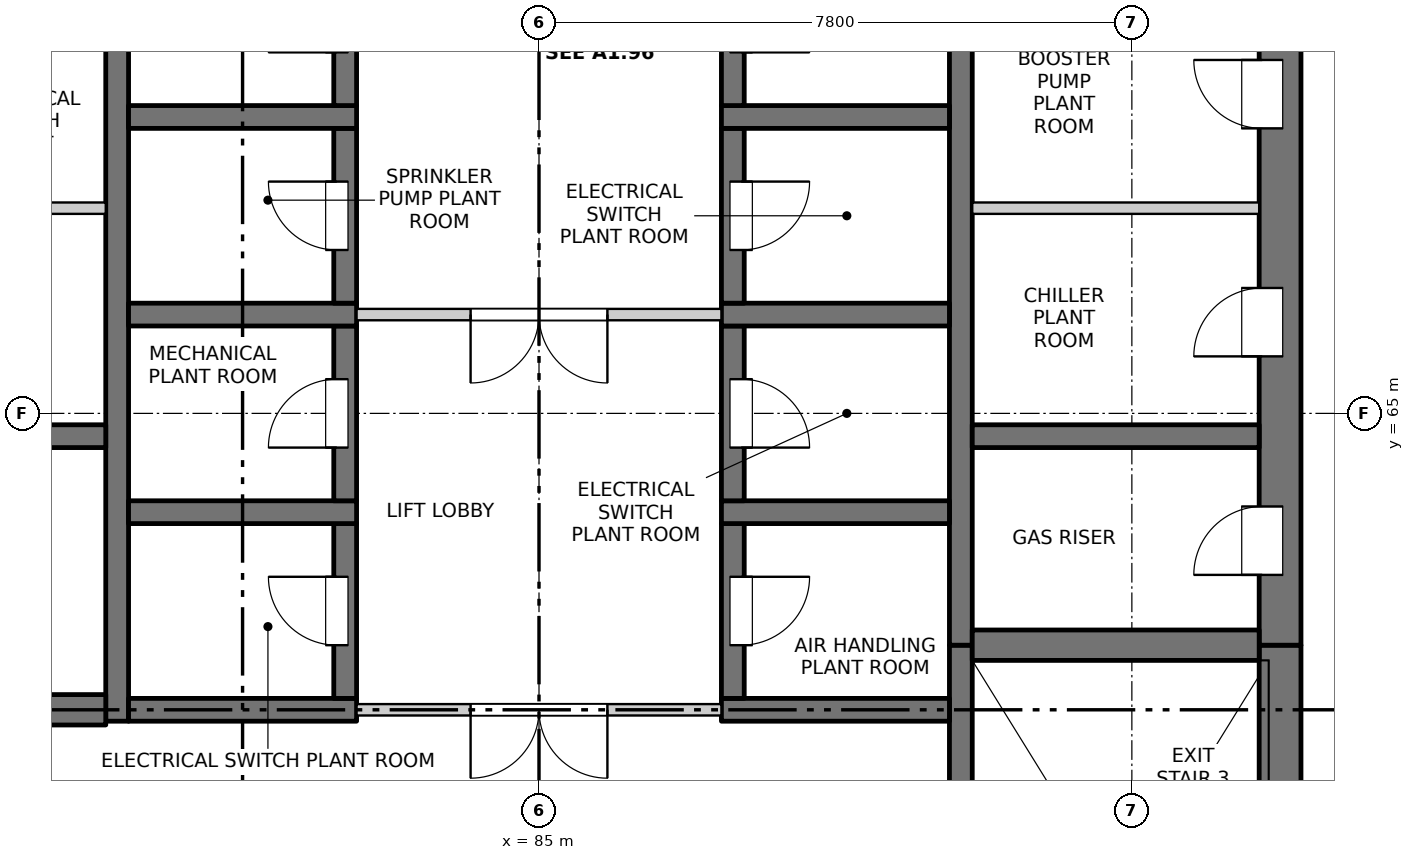
"""IFC4 building model, lengths in metres.
Left out: names, types, materials, properties, quantities, classifications, styles, units other than length and angle.
Written with IfcOpenShell. Run it as: python <this file> out.ifc"""

import sys

from ifc_helpers import new_model, si_unit, direction, frame, frame_2d, origin, place, context, subcontext, project, spatial, rectangle, extrude, element, fill, save


model = new_model("IFC4")
c1 = context("Model", 3, precision=1e-05, world=origin(), true_north=direction((0.0, 1.0)))
c2 = subcontext(c1, "Body", "Model", "MODEL_VIEW")
j1 = project(units=[si_unit("LENGTHUNIT", "METRE"), si_unit("PLANEANGLEUNIT", "RADIAN")], contexts=[c1])
p1 = place(None, origin())
s1 = spatial("IfcSite", under=j1, at=p1, CompositionType="ELEMENT")
p2 = place(p1, origin())
s2 = spatial("IfcBuilding", under=s1, at=p2, CompositionType="ELEMENT")
p3 = place(p2, frame((0.0, 0.0, 172.4)))
s3 = spatial("IfcBuildingStorey", under=s2, at=p3, CompositionType="ELEMENT", Elevation=172.4)
p4 = place(p3, frame((94.75, 54.975, -0.3), z_axis=(0.0, 0.0, 1.0), x_axis=(0.0, 1.0, 0.0)))
e1 = element("IfcWall", 1, at=p4, inside=s3, PredefinedType="SOLIDWALL", context=c2, shape_type="SweptSolid", body=[
    extrude(rectangle(XDim=6.975, YDim=0.55, at=frame_2d((3.487, 0.0))), origin(), (0.0, 0.0, 1.0), 6.8),
])
p5 = place(p4, frame((0.675, 0.0, 0.3)))
e2 = element("IfcOpeningElement", 2, at=p5, cuts=e1, PredefinedType="OPENING", context=c2, shape_type="SweptSolid", body=[
    extrude(rectangle(XDim=1.2, YDim=2.1, at=frame_2d((0.6, 1.05))), frame((0.0, 0.285, 0.0), z_axis=(0.0, -1.0, 0.0), x_axis=(1.0, 0.0, 0.0)), (0.0, 0.0, 1.0), 0.57),
])
p6 = place(p3, frame((94.75, 61.95, -0.3), z_axis=(0.0, 0.0, 1.0), x_axis=(0.0, 1.0, 0.0)))
e3 = element("IfcWall", 3, at=p6, inside=s3, PredefinedType="SOLIDWALL", context=c2, shape_type="SweptSolid", body=[
    extrude(rectangle(XDim=15.35, YDim=0.55, at=frame_2d((7.675, 0.0))), origin(), (0.0, 0.0, 1.0), 6.8),
])
p7 = place(p6, frame((0.925, 0.0, 0.3)))
e4 = element("IfcOpeningElement", 4, at=p7, cuts=e3, PredefinedType="OPENING", context=c2, shape_type="SweptSolid", body=[
    extrude(rectangle(XDim=0.9, YDim=2.1, at=frame_2d((0.45, 1.05))), frame((0.0, 0.285, 0.0), z_axis=(0.0, -1.0, 0.0), x_axis=(1.0, 0.0, 0.0)), (0.0, 0.0, 1.0), 0.57),
])
p8 = place(p6, frame((3.8, 0.0, 0.3)))
e5 = element("IfcOpeningElement", 5, at=p8, cuts=e3, PredefinedType="OPENING", context=c2, shape_type="SweptSolid", body=[
    extrude(rectangle(XDim=0.9, YDim=2.1, at=frame_2d((0.45, 1.05))), frame((0.0, 0.285, 0.0), z_axis=(0.0, -1.0, 0.0), x_axis=(1.0, 0.0, 0.0)), (0.0, 0.0, 1.0), 0.57),
])
p9 = place(p6, frame((6.8, 0.0, 0.3)))
e6 = element("IfcOpeningElement", 6, at=p9, cuts=e3, PredefinedType="OPENING", context=c2, shape_type="SweptSolid", body=[
    extrude(rectangle(XDim=0.9, YDim=2.1, at=frame_2d((0.45, 1.05))), frame((0.0, 0.285, 0.0), z_axis=(0.0, -1.0, 0.0), x_axis=(1.0, 0.0, 0.0)), (0.0, 0.0, 1.0), 0.57),
])
p10 = place(p6, frame((9.8, 0.0, 0.3)))
e7 = element("IfcOpeningElement", 7, at=p10, cuts=e3, PredefinedType="OPENING", context=c2, shape_type="SweptSolid", body=[
    extrude(rectangle(XDim=0.9, YDim=2.1, at=frame_2d((0.45, 1.05))), frame((0.0, 0.285, 0.0), z_axis=(0.0, -1.0, 0.0), x_axis=(1.0, 0.0, 0.0)), (0.0, 0.0, 1.0), 0.57),
])
p11 = place(p6, frame((13.1, 0.0, 0.3)))
e8 = element("IfcOpeningElement", 8, at=p11, cuts=e3, PredefinedType="OPENING", context=c2, shape_type="SweptSolid", body=[
    extrude(rectangle(XDim=0.9, YDim=2.1, at=frame_2d((0.45, 1.05))), frame((0.0, 0.285, 0.0), z_axis=(0.0, -1.0, 0.0), x_axis=(1.0, 0.0, 0.0)), (0.0, 0.0, 1.0), 0.57),
])
p12 = place(p3, frame((79.45, 60.95, -0.3), z_axis=(0.0, 0.0, 1.0), x_axis=(0.0, 1.0, 0.0)))
e9 = element("IfcWall", 9, at=p12, inside=s3, PredefinedType="SOLIDWALL", context=c2, shape_type="SweptSolid", body=[
    extrude(rectangle(XDim=16.35, YDim=0.3, at=frame_2d((8.175, 0.0))), origin(), (0.0, 0.0, 1.0), 6.8),
])
p13 = place(p3, frame((90.55, 55.525, -0.3), z_axis=(0.0, 0.0, 1.0), x_axis=(0.0, 1.0, 0.0)))
e10 = element("IfcWall", 10, at=p13, inside=s3, PredefinedType="SOLIDWALL", context=c2, shape_type="SweptSolid", body=[
    extrude(rectangle(XDim=6.425, YDim=0.3, at=frame_2d((3.212, 0.0))), origin(), (0.0, 0.0, 1.0), 6.8),
])
p14 = place(p13, frame((0.125, 0.0, 0.3)))
e11 = element("IfcOpeningElement", 11, at=p14, cuts=e10, PredefinedType="OPENING", context=c2, shape_type="SweptSolid", body=[
    extrude(rectangle(XDim=1.2, YDim=2.1, at=frame_2d((0.6, 1.05))), frame((0.0, 0.16, 0.0), z_axis=(0.0, -1.0, 0.0), x_axis=(1.0, 0.0, 0.0)), (0.0, 0.0, 1.0), 0.32),
])
p15 = place(p3, frame((90.55, 61.95, -0.3), z_axis=(0.0, 0.0, 1.0), x_axis=(0.0, 1.0, 0.0)))
e12 = element("IfcWall", 12, at=p15, inside=s3, PredefinedType="SOLIDWALL", context=c2, shape_type="SweptSolid", body=[
    extrude(rectangle(XDim=15.35, YDim=0.3, at=frame_2d((7.675, 0.0))), origin(), (0.0, 0.0, 1.0), 6.8),
])
p16 = place(p3, frame((79.6, 61.1, -0.3), z_axis=(0.0, 0.0, 1.0), x_axis=(1.0, 0.0, 0.0)))
e13 = element("IfcWall", 13, at=p16, inside=s3, PredefinedType="SOLIDWALL", context=c2, shape_type="SweptSolid", body=[
    extrude(rectangle(XDim=3.0, YDim=0.3, at=frame_2d((1.5, 0.0))), origin(), (0.0, 0.0, 1.0), 6.8),
])
p17 = place(p3, frame((82.45, 61.25, -0.3), z_axis=(0.0, 0.0, 1.0), x_axis=(0.0, 1.0, 0.0)))
e14 = element("IfcWall", 14, at=p17, inside=s3, PredefinedType="SOLIDWALL", context=c2, shape_type="SweptSolid", body=[
    extrude(rectangle(XDim=2.3, YDim=0.3, at=frame_2d((1.15, 0.0))), origin(), (0.0, 0.0, 1.0), 6.8),
])
p18 = place(p17, frame((0.7, 0.0, 0.3)))
e15 = element("IfcOpeningElement", 15, at=p18, cuts=e14, PredefinedType="OPENING", context=c2, shape_type="SweptSolid", body=[
    extrude(rectangle(XDim=0.9, YDim=2.1, at=frame_2d((0.45, 1.05))), frame((0.0, 0.16, 0.0), z_axis=(0.0, -1.0, 0.0), x_axis=(1.0, 0.0, 0.0)), (0.0, 0.0, 1.0), 0.32),
])
p19 = place(p3, frame((79.6, 63.7, -0.3), z_axis=(0.0, 0.0, 1.0), x_axis=(1.0, 0.0, 0.0)))
e16 = element("IfcWall", 16, at=p19, inside=s3, PredefinedType="SOLIDWALL", context=c2, shape_type="SweptSolid", body=[
    extrude(rectangle(XDim=3.0, YDim=0.3, at=frame_2d((1.5, 0.0))), origin(), (0.0, 0.0, 1.0), 6.8),
])
p20 = place(p3, frame((82.45, 63.85, -0.3), z_axis=(0.0, 0.0, 1.0), x_axis=(0.0, 1.0, 0.0)))
e17 = element("IfcWall", 17, at=p20, inside=s3, PredefinedType="SOLIDWALL", context=c2, shape_type="SweptSolid", body=[
    extrude(rectangle(XDim=2.3, YDim=0.3, at=frame_2d((1.15, 0.0))), origin(), (0.0, 0.0, 1.0), 6.8),
])
p21 = place(p20, frame((0.7, 0.0, 0.3)))
e18 = element("IfcOpeningElement", 18, at=p21, cuts=e17, PredefinedType="OPENING", context=c2, shape_type="SweptSolid", body=[
    extrude(rectangle(XDim=0.9, YDim=2.1, at=frame_2d((0.45, 1.05))), frame((0.0, 0.16, 0.0), z_axis=(0.0, -1.0, 0.0), x_axis=(1.0, 0.0, 0.0)), (0.0, 0.0, 1.0), 0.32),
])
p22 = place(p3, frame((79.6, 66.3, -0.3), z_axis=(0.0, 0.0, 1.0), x_axis=(1.0, 0.0, 0.0)))
e19 = element("IfcWall", 19, at=p22, inside=s3, PredefinedType="SOLIDWALL", context=c2, shape_type="SweptSolid", body=[
    extrude(rectangle(XDim=3.0, YDim=0.3, at=frame_2d((1.5, 0.0))), origin(), (0.0, 0.0, 1.0), 6.8),
])
p23 = place(p3, frame((82.45, 66.45, -0.3), z_axis=(0.0, 0.0, 1.0), x_axis=(0.0, 1.0, 0.0)))
e20 = element("IfcWall", 20, at=p23, inside=s3, PredefinedType="SOLIDWALL", context=c2, shape_type="SweptSolid", body=[
    extrude(rectangle(XDim=2.3, YDim=0.3, at=frame_2d((1.15, 0.0))), origin(), (0.0, 0.0, 1.0), 6.8),
])
p24 = place(p23, frame((0.7, 0.0, 0.3)))
e21 = element("IfcOpeningElement", 21, at=p24, cuts=e20, PredefinedType="OPENING", context=c2, shape_type="SweptSolid", body=[
    extrude(rectangle(XDim=0.9, YDim=2.1, at=frame_2d((0.45, 1.05))), frame((0.0, 0.16, 0.0), z_axis=(0.0, -1.0, 0.0), x_axis=(1.0, 0.0, 0.0)), (0.0, 0.0, 1.0), 0.32),
])
p25 = place(p3, frame((79.6, 68.9, -0.3), z_axis=(0.0, 0.0, 1.0), x_axis=(1.0, 0.0, 0.0)))
e22 = element("IfcWall", 22, at=p25, inside=s3, PredefinedType="SOLIDWALL", context=c2, shape_type="SweptSolid", body=[
    extrude(rectangle(XDim=3.0, YDim=0.3, at=frame_2d((1.5, 0.0))), origin(), (0.0, 0.0, 1.0), 6.8),
])
p26 = place(p3, frame((82.45, 69.05, -0.3), z_axis=(0.0, 0.0, 1.0), x_axis=(0.0, 1.0, 0.0)))
e23 = element("IfcWall", 23, at=p26, inside=s3, PredefinedType="SOLIDWALL", context=c2, shape_type="SweptSolid", body=[
    extrude(rectangle(XDim=2.3, YDim=0.3, at=frame_2d((1.15, 0.0))), origin(), (0.0, 0.0, 1.0), 6.8),
])
p27 = place(p26, frame((0.7, 0.0, 0.3)))
e24 = element("IfcOpeningElement", 24, at=p27, cuts=e23, PredefinedType="OPENING", context=c2, shape_type="SweptSolid", body=[
    extrude(rectangle(XDim=0.9, YDim=2.1, at=frame_2d((0.45, 1.05))), frame((0.0, 0.16, 0.0), z_axis=(0.0, -1.0, 0.0), x_axis=(1.0, 0.0, 0.0)), (0.0, 0.0, 1.0), 0.32),
])
p28 = place(p3, frame((87.4, 61.1, -0.3), z_axis=(0.0, 0.0, 1.0), x_axis=(1.0, 0.0, 0.0)))
e25 = element("IfcWall", 25, at=p28, inside=s3, PredefinedType="SOLIDWALL", context=c2, shape_type="SweptSolid", body=[
    extrude(rectangle(XDim=3.0, YDim=0.3, at=frame_2d((1.5, 0.0))), origin(), (0.0, 0.0, 1.0), 6.8),
])
p29 = place(p3, frame((87.55, 61.25, -0.3), z_axis=(0.0, 0.0, 1.0), x_axis=(0.0, 1.0, 0.0)))
e26 = element("IfcWall", 26, at=p29, inside=s3, PredefinedType="SOLIDWALL", context=c2, shape_type="SweptSolid", body=[
    extrude(rectangle(XDim=2.3, YDim=0.3, at=frame_2d((1.15, 0.0))), origin(), (0.0, 0.0, 1.0), 6.8),
])
p30 = place(p29, frame((0.7, 0.0, 0.3)))
e27 = element("IfcOpeningElement", 27, at=p30, cuts=e26, PredefinedType="OPENING", context=c2, shape_type="SweptSolid", body=[
    extrude(rectangle(XDim=0.9, YDim=2.1, at=frame_2d((0.45, 1.05))), frame((0.0, 0.16, 0.0), z_axis=(0.0, -1.0, 0.0), x_axis=(1.0, 0.0, 0.0)), (0.0, 0.0, 1.0), 0.32),
])
p31 = place(p3, frame((87.4, 63.7, -0.3), z_axis=(0.0, 0.0, 1.0), x_axis=(1.0, 0.0, 0.0)))
e28 = element("IfcWall", 28, at=p31, inside=s3, PredefinedType="SOLIDWALL", context=c2, shape_type="SweptSolid", body=[
    extrude(rectangle(XDim=3.0, YDim=0.3, at=frame_2d((1.5, 0.0))), origin(), (0.0, 0.0, 1.0), 6.8),
])
p32 = place(p3, frame((87.55, 63.85, -0.3), z_axis=(0.0, 0.0, 1.0), x_axis=(0.0, 1.0, 0.0)))
e29 = element("IfcWall", 29, at=p32, inside=s3, PredefinedType="SOLIDWALL", context=c2, shape_type="SweptSolid", body=[
    extrude(rectangle(XDim=2.3, YDim=0.3, at=frame_2d((1.15, 0.0))), origin(), (0.0, 0.0, 1.0), 6.8),
])
p33 = place(p32, frame((0.7, 0.0, 0.3)))
e30 = element("IfcOpeningElement", 30, at=p33, cuts=e29, PredefinedType="OPENING", context=c2, shape_type="SweptSolid", body=[
    extrude(rectangle(XDim=0.9, YDim=2.1, at=frame_2d((0.45, 1.05))), frame((0.0, 0.16, 0.0), z_axis=(0.0, -1.0, 0.0), x_axis=(1.0, 0.0, 0.0)), (0.0, 0.0, 1.0), 0.32),
])
p34 = place(p3, frame((87.4, 66.3, -0.3), z_axis=(0.0, 0.0, 1.0), x_axis=(1.0, 0.0, 0.0)))
e31 = element("IfcWall", 31, at=p34, inside=s3, PredefinedType="SOLIDWALL", context=c2, shape_type="SweptSolid", body=[
    extrude(rectangle(XDim=3.0, YDim=0.3, at=frame_2d((1.5, 0.0))), origin(), (0.0, 0.0, 1.0), 6.8),
])
p35 = place(p3, frame((87.55, 66.45, -0.3), z_axis=(0.0, 0.0, 1.0), x_axis=(0.0, 1.0, 0.0)))
e32 = element("IfcWall", 32, at=p35, inside=s3, PredefinedType="SOLIDWALL", context=c2, shape_type="SweptSolid", body=[
    extrude(rectangle(XDim=2.3, YDim=0.3, at=frame_2d((1.15, 0.0))), origin(), (0.0, 0.0, 1.0), 6.8),
])
p36 = place(p35, frame((0.7, 0.0, 0.3)))
e33 = element("IfcOpeningElement", 33, at=p36, cuts=e32, PredefinedType="OPENING", context=c2, shape_type="SweptSolid", body=[
    extrude(rectangle(XDim=0.9, YDim=2.1, at=frame_2d((0.45, 1.05))), frame((0.0, 0.16, 0.0), z_axis=(0.0, -1.0, 0.0), x_axis=(1.0, 0.0, 0.0)), (0.0, 0.0, 1.0), 0.32),
])
p37 = place(p3, frame((87.4, 68.9, -0.3), z_axis=(0.0, 0.0, 1.0), x_axis=(1.0, 0.0, 0.0)))
e34 = element("IfcWall", 34, at=p37, inside=s3, PredefinedType="SOLIDWALL", context=c2, shape_type="SweptSolid", body=[
    extrude(rectangle(XDim=3.0, YDim=0.3, at=frame_2d((1.5, 0.0))), origin(), (0.0, 0.0, 1.0), 6.8),
])
p38 = place(p3, frame((87.55, 69.05, -0.3), z_axis=(0.0, 0.0, 1.0), x_axis=(0.0, 1.0, 0.0)))
e35 = element("IfcWall", 35, at=p38, inside=s3, PredefinedType="SOLIDWALL", context=c2, shape_type="SweptSolid", body=[
    extrude(rectangle(XDim=2.3, YDim=0.3, at=frame_2d((1.15, 0.0))), origin(), (0.0, 0.0, 1.0), 6.8),
])
p39 = place(p38, frame((0.7, 0.0, 0.3)))
e36 = element("IfcOpeningElement", 36, at=p39, cuts=e35, PredefinedType="OPENING", context=c2, shape_type="SweptSolid", body=[
    extrude(rectangle(XDim=0.9, YDim=2.1, at=frame_2d((0.45, 1.05))), frame((0.0, 0.16, 0.0), z_axis=(0.0, -1.0, 0.0), x_axis=(1.0, 0.0, 0.0)), (0.0, 0.0, 1.0), 0.32),
])
p40 = place(p3, frame((75.525, 61.1, -0.3), z_axis=(0.0, 0.0, 1.0), x_axis=(1.0, 0.0, 0.0)))
e37 = element("IfcWall", 37, at=p40, inside=s3, PredefinedType="SOLIDWALL", context=c2, shape_type="SweptSolid", body=[
    extrude(rectangle(XDim=3.775, YDim=0.4, at=frame_2d((1.888, 0.0))), origin(), (0.0, 0.0, 1.0), 6.8),
])
p41 = place(p3, frame((75.525, 64.7, -0.3), z_axis=(0.0, 0.0, 1.0), x_axis=(1.0, 0.0, 0.0)))
e38 = element("IfcWall", 38, at=p41, inside=s3, PredefinedType="SOLIDWALL", context=c2, shape_type="SweptSolid", body=[
    extrude(rectangle(XDim=3.775, YDim=0.3, at=frame_2d((1.888, 0.0))), origin(), (0.0, 0.0, 1.0), 6.8),
])
p42 = place(p3, frame((90.7, 61.95, -0.3), z_axis=(0.0, 0.0, 1.0), x_axis=(1.0, 0.0, 0.0)))
e39 = element("IfcWall", 39, at=p42, inside=s3, PredefinedType="SOLIDWALL", context=c2, shape_type="SweptSolid", body=[
    extrude(rectangle(XDim=3.775, YDim=0.4, at=frame_2d((1.888, 0.0))), origin(), (0.0, 0.0, 1.0), 6.8),
])
p43 = place(p3, frame((90.7, 64.7, -0.3), z_axis=(0.0, 0.0, 1.0), x_axis=(1.0, 0.0, 0.0)))
e40 = element("IfcWall", 40, at=p43, inside=s3, PredefinedType="SOLIDWALL", context=c2, shape_type="SweptSolid", body=[
    extrude(rectangle(XDim=3.775, YDim=0.3, at=frame_2d((1.888, 0.0))), origin(), (0.0, 0.0, 1.0), 6.8),
])
p44 = place(p3, frame((82.6, 61.1, 0.0), z_axis=(0.0, 0.0, 1.0), x_axis=(1.0, 0.0, 0.0)))
e41 = element("IfcWall", 41, at=p44, inside=s3, PredefinedType="PARTITIONING", context=c2, shape_type="SweptSolid", body=[
    extrude(rectangle(XDim=4.8, YDim=0.15, at=frame_2d((2.4, 0.0))), origin(), (0.0, 0.0, 1.0), 6.5),
])
p45 = place(p44, frame((1.5, 0.0, 0.0)))
e42 = element("IfcOpeningElement", 42, at=p45, cuts=e41, PredefinedType="OPENING", context=c2, shape_type="SweptSolid", body=[
    extrude(rectangle(XDim=1.8, YDim=2.1, at=frame_2d((0.9, 1.05))), frame((0.0, 0.085, 0.0), z_axis=(0.0, -1.0, 0.0), x_axis=(1.0, 0.0, 0.0)), (0.0, 0.0, 1.0), 0.17),
])
p46 = place(p3, frame((82.6, 66.3, 0.0), z_axis=(0.0, 0.0, 1.0), x_axis=(1.0, 0.0, 0.0)))
e43 = element("IfcWall", 43, at=p46, inside=s3, PredefinedType="PARTITIONING", context=c2, shape_type="SweptSolid", body=[
    extrude(rectangle(XDim=4.8, YDim=0.15, at=frame_2d((2.4, 0.0))), origin(), (0.0, 0.0, 1.0), 6.5),
])
p47 = place(p46, frame((1.5, 0.0, 0.0)))
e44 = element("IfcOpeningElement", 44, at=p47, cuts=e43, PredefinedType="OPENING", context=c2, shape_type="SweptSolid", body=[
    extrude(rectangle(XDim=1.8, YDim=2.1, at=frame_2d((0.9, 1.05))), frame((0.0, 0.085, 0.0), z_axis=(0.0, -1.0, 0.0), x_axis=(1.0, 0.0, 0.0)), (0.0, 0.0, 1.0), 0.17),
])
for number, where, z_axis, x_axis in (
    (45, (75.525, 67.7, 0.0), (0.0, 0.0, 1.0), (1.0, 0.0, 0.0)),
    (46, (90.7, 67.7, 0.0), (0.0, 0.0, 1.0), (1.0, 0.0, 0.0)),
):
    element("IfcWall", number, at=place(p3, frame(where, z_axis=z_axis, x_axis=x_axis)), inside=s3, PredefinedType="PARTITIONING", context=c2, shape_type="SweptSolid", body=[
        extrude(rectangle(XDim=3.775, YDim=0.15, at=frame_2d((1.887, 0.0))), origin(), (0.0, 0.0, 1.0), 6.5),
    ])
p48 = place(p45, origin())
e47 = element("IfcDoor", 47, at=p48, inside=s3, OperationType="DOUBLE_DOOR_SINGLE_SWING", PredefinedType="DOOR", context=c2, shape_type="SweptSolid", body=[
    extrude(rectangle(XDim=1.8, YDim=2.1, at=frame_2d((0.9, 1.05))), frame((0.0, 0.025, 0.0), z_axis=(0.0, -1.0, 0.0), x_axis=(1.0, 0.0, 0.0)), (0.0, 0.0, 1.0), 0.05),
])
fill(e42, e47)
p49 = place(p18, origin())
e48 = element("IfcDoor", 48, at=p49, inside=s3, OperationType="SINGLE_SWING_RIGHT", PredefinedType="DOOR", context=c2, shape_type="SweptSolid", body=[
    extrude(rectangle(XDim=0.9, YDim=2.1, at=frame_2d((0.45, 1.05))), frame((0.0, 0.135, 0.0), z_axis=(0.0, -1.0, 0.0), x_axis=(1.0, 0.0, 0.0)), (0.0, 0.0, 1.0), 0.05),
])
fill(e15, e48)
p50 = place(p30, origin())
e49 = element("IfcDoor", 49, at=p50, inside=s3, OperationType="SINGLE_SWING_LEFT", PredefinedType="DOOR", context=c2, shape_type="SweptSolid", body=[
    extrude(rectangle(XDim=0.9, YDim=2.1, at=frame_2d((0.45, 1.05))), frame((0.0, -0.085, 0.0), z_axis=(0.0, -1.0, 0.0), x_axis=(1.0, 0.0, 0.0)), (0.0, 0.0, 1.0), 0.05),
])
fill(e27, e49)
p51 = place(p7, origin())
e50 = element("IfcDoor", 50, at=p51, inside=s3, OperationType="SINGLE_SWING_LEFT", PredefinedType="DOOR", context=c2, shape_type="SweptSolid", body=[
    extrude(rectangle(XDim=0.9, YDim=2.1, at=frame_2d((0.45, 1.05))), frame((0.0, 0.26, 0.0), z_axis=(0.0, -1.0, 0.0), x_axis=(1.0, 0.0, 0.0)), (0.0, 0.0, 1.0), 0.05),
])
fill(e4, e50)
p52 = place(p21, origin())
e51 = element("IfcDoor", 51, at=p52, inside=s3, OperationType="SINGLE_SWING_LEFT", PredefinedType="DOOR", context=c2, shape_type="SweptSolid", body=[
    extrude(rectangle(XDim=0.9, YDim=2.1, at=frame_2d((0.45, 1.05))), frame((0.0, 0.135, 0.0), z_axis=(0.0, -1.0, 0.0), x_axis=(1.0, 0.0, 0.0)), (0.0, 0.0, 1.0), 0.05),
])
fill(e18, e51)
p53 = place(p33, origin())
e52 = element("IfcDoor", 52, at=p53, inside=s3, OperationType="SINGLE_SWING_RIGHT", PredefinedType="DOOR", context=c2, shape_type="SweptSolid", body=[
    extrude(rectangle(XDim=0.9, YDim=2.1, at=frame_2d((0.45, 1.05))), frame((0.0, -0.085, 0.0), z_axis=(0.0, -1.0, 0.0), x_axis=(1.0, 0.0, 0.0)), (0.0, 0.0, 1.0), 0.05),
])
fill(e30, e52)
p54 = place(p8, origin())
e53 = element("IfcDoor", 53, at=p54, inside=s3, OperationType="SINGLE_SWING_LEFT", PredefinedType="DOOR", context=c2, shape_type="SweptSolid", body=[
    extrude(rectangle(XDim=0.9, YDim=2.1, at=frame_2d((0.45, 1.05))), frame((0.0, 0.26, 0.0), z_axis=(0.0, -1.0, 0.0), x_axis=(1.0, 0.0, 0.0)), (0.0, 0.0, 1.0), 0.05),
])
fill(e5, e53)
p55 = place(p47, origin())
e54 = element("IfcDoor", 54, at=p55, inside=s3, OperationType="DOUBLE_DOOR_SINGLE_SWING", PredefinedType="DOOR", context=c2, shape_type="SweptSolid", body=[
    extrude(rectangle(XDim=1.8, YDim=2.1, at=frame_2d((0.9, 1.05))), frame((0.0, 0.025, 0.0), z_axis=(0.0, -1.0, 0.0), x_axis=(1.0, 0.0, 0.0)), (0.0, 0.0, 1.0), 0.05),
])
fill(e44, e54)
p56 = place(p24, origin())
e55 = element("IfcDoor", 55, at=p56, inside=s3, OperationType="SINGLE_SWING_RIGHT", PredefinedType="DOOR", context=c2, shape_type="SweptSolid", body=[
    extrude(rectangle(XDim=0.9, YDim=2.1, at=frame_2d((0.45, 1.05))), frame((0.0, 0.135, 0.0), z_axis=(0.0, -1.0, 0.0), x_axis=(1.0, 0.0, 0.0)), (0.0, 0.0, 1.0), 0.05),
])
fill(e21, e55)
p57 = place(p36, origin())
e56 = element("IfcDoor", 56, at=p57, inside=s3, OperationType="SINGLE_SWING_LEFT", PredefinedType="DOOR", context=c2, shape_type="SweptSolid", body=[
    extrude(rectangle(XDim=0.9, YDim=2.1, at=frame_2d((0.45, 1.05))), frame((0.0, -0.085, 0.0), z_axis=(0.0, -1.0, 0.0), x_axis=(1.0, 0.0, 0.0)), (0.0, 0.0, 1.0), 0.05),
])
fill(e33, e56)
p58 = place(p9, origin())
e57 = element("IfcDoor", 57, at=p58, inside=s3, OperationType="SINGLE_SWING_RIGHT", PredefinedType="DOOR", context=c2, shape_type="SweptSolid", body=[
    extrude(rectangle(XDim=0.9, YDim=2.1, at=frame_2d((0.45, 1.05))), frame((0.0, 0.26, 0.0), z_axis=(0.0, -1.0, 0.0), x_axis=(1.0, 0.0, 0.0)), (0.0, 0.0, 1.0), 0.05),
])
fill(e6, e57)
save(model, sys.argv[1])
